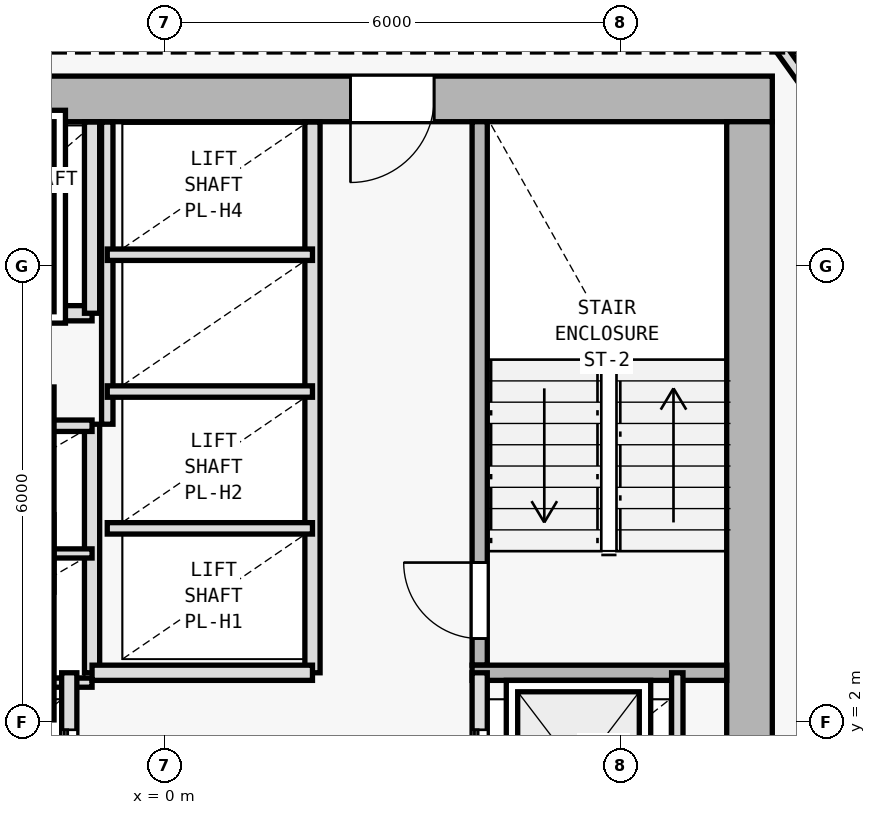
"""IFC4 building model, lengths in metres.
Left out: names, types, materials, properties, quantities, classifications, styles, units other than length and angle.
Written with IfcOpenShell. Run it as: python <this file> out.ifc"""

import sys

from ifc_helpers import new_model, si_unit, direction, frame, frame_2d, origin, origin_2d, place, context, subcontext, project, spatial, rectangle, i_section, extrude, element, fill, save


model = new_model("IFC4")
c1 = context("Model", 3, precision=1e-05, world=origin(), true_north=direction((0.0, 1.0)))
c2 = subcontext(c1, "Body", "Model", "MODEL_VIEW")
j1 = project(units=[si_unit("LENGTHUNIT", "METRE"), si_unit("PLANEANGLEUNIT", "RADIAN")], contexts=[c1])
p1 = place(None, origin())
s1 = spatial("IfcSite", under=j1, at=p1, CompositionType="ELEMENT")
p2 = place(p1, origin())
s2 = spatial("IfcBuilding", under=s1, at=p2, CompositionType="ELEMENT")
p3 = place(p2, frame((0.0, 0.0, 104.1)))
s3 = spatial("IfcBuildingStorey", under=s2, at=p3, CompositionType="ELEMENT", Elevation=104.1)
p4 = place(p3, frame((7.7, 10.2, 0.0), z_axis=(0.0, 0.0, 1.0), x_axis=(1.0, 0.0, 0.0)))
e1 = element("IfcColumn", 1, at=p4, inside=s3, PredefinedType="COLUMN", context=c2, shape_type="SweptSolid", body=[
    extrude(i_section(OverallWidth=0.409, OverallDepth=0.425, WebThickness=0.021, FlangeThickness=0.034, FilletRadius=0.015, at=origin_2d()), origin(), (0.0, 0.0, 1.0), 3.6),
])
p5 = place(p3, frame((8.0, 10.2, 0.0), z_axis=(0.0, 0.0, 1.0), x_axis=(-1.0, 0.0, 0.0)))
e2 = element("IfcWall", 2, at=p5, inside=s3, PredefinedType="SHEAR", context=c2, shape_type="SweptSolid", body=[
    extrude(rectangle(XDim=16.0, YDim=0.6, at=frame_2d((8.0, 0.0))), origin(), (0.0, 0.0, 1.0), 3.35),
])
p6 = place(p5, frame((4.45, 0.0, 0.0)))
e3 = element("IfcOpeningElement", 3, at=p6, cuts=e2, PredefinedType="OPENING", context=c2, shape_type="SweptSolid", body=[
    extrude(rectangle(XDim=1.1, YDim=2.15, at=frame_2d((0.55, 1.075))), frame((0.0, 0.31, 0.0), z_axis=(0.0, -1.0, 0.0), x_axis=(1.0, 0.0, 0.0)), (0.0, 0.0, 1.0), 0.62),
])
p7 = place(p3, frame((7.7, 9.9, 0.0), z_axis=(0.0, 0.0, 1.0), x_axis=(0.0, -1.0, 0.0)))
e4 = element("IfcWall", 4, at=p7, inside=s3, PredefinedType="SHEAR", context=c2, shape_type="SweptSolid", body=[
    extrude(rectangle(XDim=19.0, YDim=0.6, at=frame_2d((9.5, 0.0))), origin(), (0.0, 0.0, 1.0), 3.35),
])
p8 = place(p3, frame((4.15, 2.75, 0.0), z_axis=(0.0, 0.0, 1.0), x_axis=(0.0, 1.0, 0.0)))
e5 = element("IfcWall", 5, at=p8, inside=s3, PredefinedType="SOLIDWALL", context=c2, shape_type="SweptSolid", body=[
    extrude(rectangle(XDim=7.15, YDim=0.2, at=frame_2d((3.575, 0.0))), origin(), (0.0, 0.0, 1.0), 3.35),
])
p9 = place(p8, frame((0.35, 0.0, 0.0)))
e6 = element("IfcOpeningElement", 6, at=p9, cuts=e5, PredefinedType="OPENING", context=c2, shape_type="SweptSolid", body=[
    extrude(rectangle(XDim=1.0, YDim=2.15, at=frame_2d((0.5, 1.075))), frame((0.0, 0.11, 0.0), z_axis=(0.0, -1.0, 0.0), x_axis=(1.0, 0.0, 0.0)), (0.0, 0.0, 1.0), 0.22),
])
p10 = place(p3, frame((4.05, 2.65, 0.0), z_axis=(0.0, 0.0, 1.0), x_axis=(1.0, 0.0, 0.0)))
e7 = element("IfcWall", 7, at=p10, inside=s3, PredefinedType="SOLIDWALL", context=c2, shape_type="SweptSolid", body=[
    extrude(rectangle(XDim=3.35, YDim=0.2, at=frame_2d((1.675, 0.0))), origin(), (0.0, 0.0, 1.0), 3.35),
])
p11 = place(p3, frame((-0.95, 2.65, 0.0), z_axis=(0.0, 0.0, 1.0), x_axis=(0.0, 1.0, 0.0)))
e8 = element("IfcWall", 8, at=p11, inside=s3, PredefinedType="SOLIDWALL", context=c2, shape_type="SweptSolid", body=[
    extrude(rectangle(XDim=3.27, YDim=0.2, at=frame_2d((1.635, 0.0))), origin(), (0.0, 0.0, 1.0), 3.35),
])
for number, where, z_axis, x_axis in (
    (9, (-3.85, 2.52, 0.0), (0.0, 0.0, 1.0), (1.0, 0.0, 0.0)),
    (10, (-3.85, 4.22, 0.0), (0.0, 0.0, 1.0), (1.0, 0.0, 0.0)),
):
    element("IfcWall", number, at=place(p3, frame(where, z_axis=z_axis, x_axis=x_axis)), inside=s3, PredefinedType="PARTITIONING", context=c2, shape_type="SweptSolid", body=[
        extrude(rectangle(XDim=2.9, YDim=0.12, at=frame_2d((1.45, 0.0))), origin(), (0.0, 0.0, 1.0), 3.35),
    ])
p12 = place(p3, frame((-3.85, 5.9, 0.0), z_axis=(0.0, 0.0, 1.0), x_axis=(1.0, 0.0, 0.0)))
e11 = element("IfcWall", 11, at=p12, inside=s3, PredefinedType="PARTITIONING", context=c2, shape_type="SweptSolid", body=[
    extrude(rectangle(XDim=2.9, YDim=0.15, at=frame_2d((1.45, 0.0))), origin(), (0.0, 0.0, 1.0), 3.35),
])
p13 = place(p3, frame((-3.85, 7.38, 0.0), z_axis=(0.0, 0.0, 1.0), x_axis=(1.0, 0.0, 0.0)))
e12 = element("IfcWall", 12, at=p13, inside=s3, PredefinedType="SOLIDWALL", context=c2, shape_type="SweptSolid", body=[
    extrude(rectangle(XDim=2.9, YDim=0.2, at=frame_2d((1.45, 0.0))), origin(), (0.0, 0.0, 1.0), 3.35),
])
p14 = place(p13, frame((0.85, 0.0, 0.0)))
e13 = element("IfcOpeningElement", 13, at=p14, cuts=e12, PredefinedType="OPENING", context=c2, shape_type="SweptSolid", body=[
    extrude(rectangle(XDim=1.2, YDim=2.2, at=frame_2d((0.6, 1.1))), frame((0.0, 0.11, 0.0), z_axis=(0.0, -1.0, 0.0), x_axis=(1.0, 0.0, 0.0)), (0.0, 0.0, 1.0), 0.22),
])
p15 = place(p3, frame((-0.95, 7.38, 0.0), z_axis=(0.0, 0.0, 1.0), x_axis=(0.0, 1.0, 0.0)))
e14 = element("IfcWall", 14, at=p15, inside=s3, PredefinedType="SOLIDWALL", context=c2, shape_type="SweptSolid", body=[
    extrude(rectangle(XDim=2.515, YDim=0.2, at=frame_2d((1.258, 0.0))), origin(), (0.0, 0.0, 1.0), 3.35),
])
p16 = place(p3, frame((4.15, -6.05, 0.0), z_axis=(0.0, 0.0, 1.0), x_axis=(0.0, 1.0, 0.0)))
e15 = element("IfcWall", 15, at=p16, inside=s3, PredefinedType="SOLIDWALL", context=c2, shape_type="SweptSolid", body=[
    extrude(rectangle(XDim=8.7, YDim=0.2, at=frame_2d((4.35, 0.0))), origin(), (0.0, 0.0, 1.0), 3.35),
])
p17 = place(p16, frame((0.55, 0.0, 0.0)))
e16 = element("IfcOpeningElement", 16, at=p17, cuts=e15, PredefinedType="OPENING", context=c2, shape_type="SweptSolid", body=[
    extrude(rectangle(XDim=1.1, YDim=2.15, at=frame_2d((0.55, 1.075))), frame((0.0, 0.11, 0.0), z_axis=(0.0, -1.0, 0.0), x_axis=(1.0, 0.0, 0.0)), (0.0, 0.0, 1.0), 0.22),
])
p18 = place(p16, frame((2.65, 0.0, 0.0)))
e17 = element("IfcOpeningElement", 17, at=p18, cuts=e15, PredefinedType="OPENING", context=c2, shape_type="SweptSolid", body=[
    extrude(rectangle(XDim=1.1, YDim=2.15, at=frame_2d((0.55, 1.075))), frame((0.0, 0.11, 0.0), z_axis=(0.0, -1.0, 0.0), x_axis=(1.0, 0.0, 0.0)), (0.0, 0.0, 1.0), 0.22),
])
p19 = place(p16, frame((4.75, 0.0, 0.0)))
e18 = element("IfcOpeningElement", 18, at=p19, cuts=e15, PredefinedType="OPENING", context=c2, shape_type="SweptSolid", body=[
    extrude(rectangle(XDim=1.1, YDim=2.15, at=frame_2d((0.55, 1.075))), frame((0.0, 0.11, 0.0), z_axis=(0.0, -1.0, 0.0), x_axis=(1.0, 0.0, 0.0)), (0.0, 0.0, 1.0), 0.22),
])
p20 = place(p16, frame((6.85, 0.0, 0.0)))
e19 = element("IfcOpeningElement", 19, at=p20, cuts=e15, PredefinedType="OPENING", context=c2, shape_type="SweptSolid", body=[
    extrude(rectangle(XDim=1.1, YDim=2.15, at=frame_2d((0.55, 1.075))), frame((0.0, 0.11, 0.0), z_axis=(0.0, -1.0, 0.0), x_axis=(1.0, 0.0, 0.0)), (0.0, 0.0, 1.0), 0.22),
])
p21 = place(p3, frame((6.75, -6.05, 0.0), z_axis=(0.0, 0.0, 1.0), x_axis=(0.0, 1.0, 0.0)))
e20 = element("IfcWall", 20, at=p21, inside=s3, PredefinedType="PARTITIONING", context=c2, shape_type="SweptSolid", body=[
    extrude(rectangle(XDim=8.7, YDim=0.15, at=frame_2d((4.35, 0.0))), origin(), (0.0, 0.0, 1.0), 3.35),
])
p22 = place(p3, frame((-1.25, -6.05, 0.0), z_axis=(0.0, 0.0, 1.0), x_axis=(0.0, 1.0, 0.0)))
e21 = element("IfcWall", 21, at=p22, inside=s3, PredefinedType="SOLIDWALL", context=c2, shape_type="SweptSolid", body=[
    extrude(rectangle(XDim=8.7, YDim=0.2, at=frame_2d((4.35, 0.0))), origin(), (0.0, 0.0, 1.0), 3.35),
])
p23 = place(p22, frame((0.55, 0.0, 0.0)))
e22 = element("IfcOpeningElement", 22, at=p23, cuts=e21, PredefinedType="OPENING", context=c2, shape_type="SweptSolid", body=[
    extrude(rectangle(XDim=1.1, YDim=2.15, at=frame_2d((0.55, 1.075))), frame((0.0, 0.11, 0.0), z_axis=(0.0, -1.0, 0.0), x_axis=(1.0, 0.0, 0.0)), (0.0, 0.0, 1.0), 0.22),
])
p24 = place(p22, frame((2.65, 0.0, 0.0)))
e23 = element("IfcOpeningElement", 23, at=p24, cuts=e21, PredefinedType="OPENING", context=c2, shape_type="SweptSolid", body=[
    extrude(rectangle(XDim=1.1, YDim=2.15, at=frame_2d((0.55, 1.075))), frame((0.0, 0.11, 0.0), z_axis=(0.0, -1.0, 0.0), x_axis=(1.0, 0.0, 0.0)), (0.0, 0.0, 1.0), 0.22),
])
p25 = place(p22, frame((4.75, 0.0, 0.0)))
e24 = element("IfcOpeningElement", 24, at=p25, cuts=e21, PredefinedType="OPENING", context=c2, shape_type="SweptSolid", body=[
    extrude(rectangle(XDim=1.1, YDim=2.15, at=frame_2d((0.55, 1.075))), frame((0.0, 0.11, 0.0), z_axis=(0.0, -1.0, 0.0), x_axis=(1.0, 0.0, 0.0)), (0.0, 0.0, 1.0), 0.22),
])
p26 = place(p22, frame((6.85, 0.0, 0.0)))
e25 = element("IfcOpeningElement", 25, at=p26, cuts=e21, PredefinedType="OPENING", context=c2, shape_type="SweptSolid", body=[
    extrude(rectangle(XDim=1.1, YDim=2.15, at=frame_2d((0.55, 1.075))), frame((0.0, 0.11, 0.0), z_axis=(0.0, -1.0, 0.0), x_axis=(1.0, 0.0, 0.0)), (0.0, 0.0, 1.0), 0.22),
])
p27 = place(p3, frame((1.95, 2.65, 0.0), z_axis=(0.0, 0.0, 1.0), x_axis=(0.0, 1.0, 0.0)))
e26 = element("IfcWall", 26, at=p27, inside=s3, PredefinedType="SOLIDWALL", context=c2, shape_type="SweptSolid", body=[
    extrude(rectangle(XDim=7.245, YDim=0.2, at=frame_2d((3.623, 0.0))), origin(), (0.0, 0.0, 1.0), 3.35),
])
p28 = place(p3, frame((-0.95, 2.65, 0.0), z_axis=(0.0, 0.0, 1.0), x_axis=(1.0, 0.0, 0.0)))
e27 = element("IfcWall", 27, at=p28, inside=s3, PredefinedType="SOLIDWALL", context=c2, shape_type="SweptSolid", body=[
    extrude(rectangle(XDim=2.9, YDim=0.2, at=frame_2d((1.45, 0.0))), origin(), (0.0, 0.0, 1.0), 3.35),
])
p29 = place(p3, frame((-0.75, 5.92, 0.0), z_axis=(0.0, 0.0, 1.0), x_axis=(0.0, 1.0, 0.0)))
e28 = element("IfcWall", 28, at=p29, inside=s3, PredefinedType="PARTITIONING", context=c2, shape_type="SweptSolid", body=[
    extrude(rectangle(XDim=3.975, YDim=0.15, at=frame_2d((1.988, 0.0))), origin(), (0.0, 0.0, 1.0), 3.35),
])
for number, where, z_axis, x_axis in (
    (29, (-0.75, 4.55, 0.0), (0.0, 0.0, 1.0), (1.0, 0.0, 0.0)),
    (30, (-0.75, 6.35, 0.0), (0.0, 0.0, 1.0), (1.0, 0.0, 0.0)),
    (31, (-0.75, 8.15, 0.0), (0.0, 0.0, 1.0), (1.0, 0.0, 0.0)),
):
    element("IfcWall", number, at=place(p3, frame(where, z_axis=z_axis, x_axis=x_axis)), inside=s3, PredefinedType="PARTITIONING", context=c2, shape_type="SweptSolid", body=[
        extrude(rectangle(XDim=2.7, YDim=0.15, at=frame_2d((1.35, 0.0))), origin(), (0.0, 0.0, 1.0), 3.35),
    ])
p30 = place(p3, frame((7.041, 12.36, 0.0), z_axis=(0.0, 0.0, 1.0), x_axis=(0.582449511476, -0.812866881218, 0.0)))
e32 = element("IfcWall", 32, at=p30, inside=s3, PredefinedType="PARTITIONING", context=c2, shape_type="SweptSolid", body=[
    extrude(rectangle(XDim=4.84, YDim=0.15, at=frame_2d((2.42, 0.0))), origin(), (0.0, 0.0, 1.0), 2.965),
])
p31 = place(p30, frame((0.851, 0.0, 0.0)))
e33 = element("IfcOpeningElement", 33, at=p31, cuts=e32, PredefinedType="OPENING", context=c2, shape_type="SweptSolid", body=[
    extrude(rectangle(XDim=0.9, YDim=2.1, at=frame_2d((0.45, 1.05))), frame((0.0, 0.085, 0.0), z_axis=(0.0, -1.0, 0.0), x_axis=(1.0, 0.0, 0.0)), (0.0, 0.0, 1.0), 0.17),
])
p32 = place(p6, origin())
e34 = element("IfcDoor", 34, at=p32, inside=s3, OperationType="SINGLE_SWING_RIGHT", PredefinedType="DOOR", context=c2, shape_type="SweptSolid", body=[
    extrude(rectangle(XDim=1.1, YDim=2.15, at=frame_2d((0.55, 1.075))), frame((0.0, 0.025, 0.0), z_axis=(0.0, -1.0, 0.0), x_axis=(1.0, 0.0, 0.0)), (0.0, 0.0, 1.0), 0.05),
])
fill(e3, e34)
p33 = place(p9, origin())
e35 = element("IfcDoor", 35, at=p33, inside=s3, OperationType="SINGLE_SWING_RIGHT", PredefinedType="DOOR", context=c2, shape_type="SweptSolid", body=[
    extrude(rectangle(XDim=1.0, YDim=2.15, at=frame_2d((0.5, 1.075))), frame((0.0, 0.025, 0.0), z_axis=(0.0, -1.0, 0.0), x_axis=(1.0, 0.0, 0.0)), (0.0, 0.0, 1.0), 0.05),
])
fill(e6, e35)
p34 = place(p20, origin())
e36 = element("IfcDoor", 36, at=p34, inside=s3, OperationType="DOUBLE_DOOR_SLIDING", PredefinedType="DOOR", context=c2, shape_type="SweptSolid", body=[
    extrude(rectangle(XDim=1.1, YDim=2.15, at=frame_2d((0.55, 1.075))), frame((0.0, 0.025, 0.0), z_axis=(0.0, -1.0, 0.0), x_axis=(1.0, 0.0, 0.0)), (0.0, 0.0, 1.0), 0.05),
])
fill(e19, e36)
p35 = place(p26, origin())
e37 = element("IfcDoor", 37, at=p35, inside=s3, OperationType="DOUBLE_DOOR_SLIDING", PredefinedType="DOOR", context=c2, shape_type="SweptSolid", body=[
    extrude(rectangle(XDim=1.1, YDim=2.15, at=frame_2d((0.55, 1.075))), frame((0.0, 0.025, 0.0), z_axis=(0.0, -1.0, 0.0), x_axis=(1.0, 0.0, 0.0)), (0.0, 0.0, 1.0), 0.05),
])
fill(e25, e37)
save(model, sys.argv[1])
